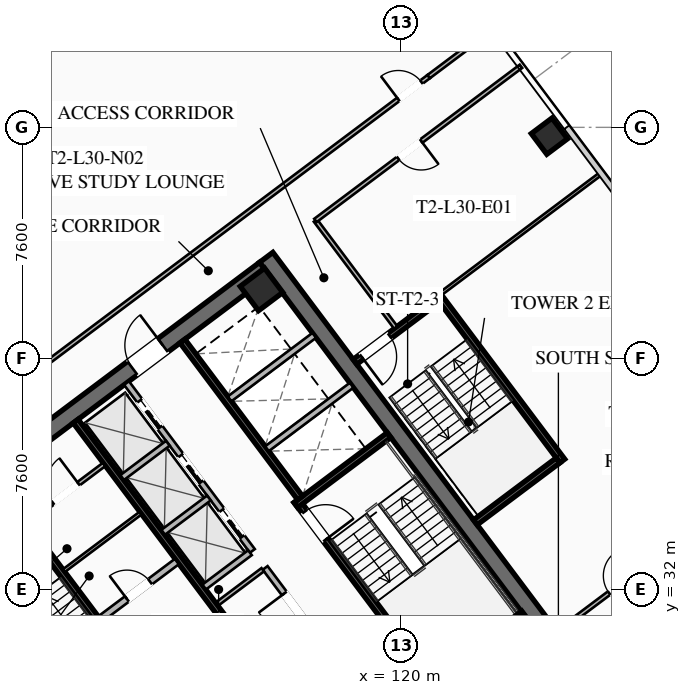
"""IFC4 building model, lengths in metres.
Left out: names, types, materials, properties, quantities, classifications, styles, units other than length and angle.
Written with IfcOpenShell. Run it as: python <this file> out.ifc"""

import sys

from ifc_helpers import new_model, si_unit, direction, frame, frame_2d, origin, origin_2d, place, context, subcontext, project, spatial, rectangle, hollow_rectangle, extrude, element, fill, save


model = new_model("IFC4")
c1 = context("Model", 3, precision=1e-05, world=origin(), true_north=direction((0.0, 1.0)))
c2 = subcontext(c1, "Body", "Model", "MODEL_VIEW")
j1 = project(units=[si_unit("LENGTHUNIT", "METRE"), si_unit("PLANEANGLEUNIT", "RADIAN")], contexts=[c1])
p1 = place(None, origin())
s1 = spatial("IfcSite", under=j1, at=p1, CompositionType="ELEMENT")
p2 = place(p1, origin())
s2 = spatial("IfcBuilding", under=s1, at=p2, CompositionType="ELEMENT")
p3 = place(p2, frame((0.0, 0.0, 114.4)))
s3 = spatial("IfcBuildingStorey", under=s2, at=p3, CompositionType="ELEMENT", Elevation=114.4)
for number, where, z_axis, x_axis in (
    (1, (112.436, 21.077, 0.0), (0.0, 0.0, 1.0), (-0.6, 0.8, 0.0)),
    (2, (115.564, 42.923, 0.0), (0.0, 0.0, 1.0), (0.6, -0.8, 0.0)),
):
    element("IfcWall", number, at=place(p3, frame(where, z_axis=z_axis, x_axis=x_axis)), inside=s3, PredefinedType="SHEAR", context=c2, shape_type="SweptSolid", body=[
        extrude(rectangle(XDim=15.6, YDim=0.55, at=frame_2d((7.8, 0.0))), origin(), (0.0, 0.0, 1.0), 3.55),
    ])
p4 = place(p3, frame((103.461, 33.502, 0.0), z_axis=(0.0, 0.0, 1.0), x_axis=(0.799998054672, 0.600002593761, 0.0)))
e3 = element("IfcWall", 3, at=p4, inside=s3, PredefinedType="SHEAR", context=c2, shape_type="SweptSolid", body=[
    extrude(rectangle(XDim=15.06, YDim=0.55, at=frame_2d((7.53, 0.0))), origin(), (0.0, 0.0, 1.0), 3.55),
])
p5 = place(p4, frame((4.58, 0.0, 0.0)))
e4 = element("IfcOpeningElement", 4, at=p5, cuts=e3, PredefinedType="OPENING", context=c2, shape_type="SweptSolid", body=[
    extrude(rectangle(XDim=1.25, YDim=2.25, at=frame_2d((0.625, 1.125))), frame((0.0, 0.285, 0.0), z_axis=(0.0, -1.0, 0.0), x_axis=(1.0, 0.0, 0.0)), (0.0, 0.0, 1.0), 0.57),
])
p6 = place(p4, frame((9.63, 0.0, 0.0)))
e5 = element("IfcOpeningElement", 5, at=p6, cuts=e3, PredefinedType="OPENING", context=c2, shape_type="SweptSolid", body=[
    extrude(rectangle(XDim=1.25, YDim=2.25, at=frame_2d((0.625, 1.125))), frame((0.0, 0.285, 0.0), z_axis=(0.0, -1.0, 0.0), x_axis=(1.0, 0.0, 0.0)), (0.0, 0.0, 1.0), 0.57),
])
for number, where, z_axis, x_axis in (
    (6, (123.87, 30.59, 0.0), (0.0, 0.0, 1.0), (0.8, 0.6, 0.0)),
    (7, (115.41, 41.87, 0.0), (0.0, 0.0, 1.0), (0.8, 0.6, 0.0)),
):
    element("IfcColumn", number, at=place(p3, frame(where, z_axis=z_axis, x_axis=x_axis)), inside=s3, PredefinedType="COLUMN", context=c2, shape_type="SweptSolid", body=[
        extrude(hollow_rectangle(XDim=1.0, YDim=1.0, WallThickness=0.04, at=origin_2d()), origin(), (0.0, 0.0, 1.0), 3.37),
    ])
p7 = place(p3, frame((124.88, 46.91, 0.0), z_axis=(0.0, 0.0, 1.0), x_axis=(0.799999996291, 0.600000004945, 0.0)))
e8 = element("IfcColumn", 8, at=p7, inside=s3, PredefinedType="COLUMN", context=c2, shape_type="SweptSolid", body=[
    extrude(hollow_rectangle(XDim=0.85, YDim=0.85, WallThickness=0.035, at=origin_2d()), origin(), (0.0, 0.0, 1.0), 3.37),
])
p8 = place(p3, frame((111.44, 29.08, 0.0), z_axis=(0.0, 0.0, 1.0), x_axis=(-0.59999029481, 0.8000072788, 0.0)))
e9 = element("IfcWall", 9, at=p8, inside=s3, PredefinedType="SHEAR", context=c2, shape_type="SweptSolid", body=[
    extrude(rectangle(XDim=8.05, YDim=0.2, at=frame_2d((4.025, 0.0))), origin(), (0.0, 0.0, 1.0), 3.37),
])
p9 = place(p8, frame((0.45, 0.0, 0.0)))
e10 = element("IfcOpeningElement", 10, at=p9, cuts=e9, PredefinedType="OPENING", context=c2, shape_type="SweptSolid", body=[
    extrude(rectangle(XDim=1.15, YDim=2.2, at=frame_2d((0.575, 1.1))), frame((0.0, 0.11, 0.0), z_axis=(0.0, -1.0, 0.0), x_axis=(1.0, 0.0, 0.0)), (0.0, 0.0, 1.0), 0.22),
])
p10 = place(p3, frame((116.56, 34.92, 0.0), z_axis=(0.0, 0.0, 1.0), x_axis=(0.59999029481, -0.8000072788, 0.0)))
e11 = element("IfcWall", 11, at=p10, inside=s3, PredefinedType="SHEAR", context=c2, shape_type="SweptSolid", body=[
    extrude(rectangle(XDim=8.05, YDim=0.2, at=frame_2d((4.025, 0.0))), origin(), (0.0, 0.0, 1.0), 3.37),
])
p11 = place(p10, frame((0.45, 0.0, 0.0)))
e12 = element("IfcOpeningElement", 12, at=p11, cuts=e11, PredefinedType="OPENING", context=c2, shape_type="SweptSolid", body=[
    extrude(rectangle(XDim=1.15, YDim=2.2, at=frame_2d((0.575, 1.1))), frame((0.0, 0.11, 0.0), z_axis=(0.0, -1.0, 0.0), x_axis=(1.0, 0.0, 0.0)), (0.0, 0.0, 1.0), 0.22),
])
for number, where, z_axis, x_axis in (
    (13, (116.54, 34.78, 0.0), (0.0, 0.0, 1.0), (0.8, 0.6, 0.0)),
    (14, (120.98, 28.86, 0.0), (0.0, 0.0, 1.0), (0.8, 0.6, 0.0)),
):
    element("IfcWall", number, at=place(p3, frame(where, z_axis=z_axis, x_axis=x_axis)), inside=s3, PredefinedType="SHEAR", context=c2, shape_type="SweptSolid", body=[
        extrude(rectangle(XDim=3.83, YDim=0.2, at=frame_2d((1.915, 0.0))), origin(), (0.0, 0.0, 1.0), 3.37),
    ])
p12 = place(p3, frame((117.998, 25.936, 0.0), z_axis=(0.0, 0.0, 1.0), x_axis=(-0.600002693989, 0.799997979501, 0.0)))
e15 = element("IfcWall", 15, at=p12, inside=s3, PredefinedType="SHEAR", context=c2, shape_type="SweptSolid", body=[
    extrude(rectangle(XDim=14.5, YDim=0.2, at=frame_2d((7.25, 0.0))), origin(), (0.0, 0.0, 1.0), 3.37),
])
p13 = place(p3, frame((110.104, 31.028, 0.0), z_axis=(0.0, 0.0, 1.0), x_axis=(0.800018601094, 0.59997519774, 0.0)))
e16 = element("IfcWall", 16, at=p13, inside=s3, PredefinedType="SOLIDWALL", context=c2, shape_type="SweptSolid", body=[
    extrude(rectangle(XDim=3.15, YDim=0.22, at=frame_2d((1.575, 0.0))), origin(), (0.0, 0.0, 1.0), 2.723),
])
p14 = place(p13, frame((1.1, 0.0, 0.0)))
e17 = element("IfcOpeningElement", 17, at=p14, cuts=e16, PredefinedType="OPENING", context=c2, shape_type="SweptSolid", body=[
    extrude(rectangle(XDim=0.95, YDim=2.05, at=frame_2d((0.475, 1.025))), frame((0.0, 0.12, 0.0), z_axis=(0.0, -1.0, 0.0), x_axis=(1.0, 0.0, 0.0)), (0.0, 0.0, 1.0), 0.24),
])
p15 = place(p3, frame((112.81, 40.17, 0.0), z_axis=(0.0, 0.0, 1.0), x_axis=(0.599993943644, -0.800004542231, 0.0)))
e18 = element("IfcWall", 18, at=p15, inside=s3, PredefinedType="SHEAR", context=c2, shape_type="SweptSolid", body=[
    extrude(rectangle(XDim=6.45, YDim=0.2, at=frame_2d((3.225, 0.0))), origin(), (0.0, 0.0, 1.0), 3.37),
])
for number, where, z_axis, x_axis in (
    (19, (115.59, 36.63, 0.0), (0.0, 0.0, 1.0), (0.8, 0.6, 0.0)),
    (20, (114.36, 38.27, 0.0), (0.0, 0.0, 1.0), (0.8, 0.6, 0.0)),
):
    element("IfcWall", number, at=place(p3, frame(where, z_axis=z_axis, x_axis=x_axis)), inside=s3, PredefinedType="SOLIDWALL", context=c2, shape_type="SweptSolid", body=[
        extrude(rectangle(XDim=3.48, YDim=0.2, at=frame_2d((1.74, 0.0))), origin(), (0.0, 0.0, 1.0), 3.37),
    ])
p16 = place(p3, frame((107.71, 34.22, 0.0), z_axis=(0.0, 0.0, 1.0), x_axis=(0.799981399002, 0.60002480053, 0.0)))
e21 = element("IfcWall", 21, at=p16, inside=s3, PredefinedType="PARTITIONING", context=c2, shape_type="SweptSolid", body=[
    extrude(rectangle(XDim=3.15, YDim=0.135, at=frame_2d((1.575, 0.0))), origin(), (0.0, 0.0, 1.0), 2.723),
])
p17 = place(p16, frame((1.05, 0.0, 0.0)))
e22 = element("IfcOpeningElement", 22, at=p17, cuts=e21, PredefinedType="OPENING", context=c2, shape_type="SweptSolid", body=[
    extrude(rectangle(XDim=1.05, YDim=2.2, at=frame_2d((0.525, 1.1))), frame((0.0, 0.077, 0.0), z_axis=(0.0, -1.0, 0.0), x_axis=(1.0, 0.0, 0.0)), (0.0, 0.0, 1.0), 0.155),
])
p18 = place(p3, frame((108.91, 32.62, 0.0), z_axis=(0.0, 0.0, 1.0), x_axis=(0.800018601094, 0.59997519774, 0.0)))
e23 = element("IfcWall", 23, at=p18, inside=s3, PredefinedType="PARTITIONING", context=c2, shape_type="SweptSolid", body=[
    extrude(rectangle(XDim=3.15, YDim=0.11, at=frame_2d((1.575, 0.0))), origin(), (0.0, 0.0, 1.0), 2.723),
])
p19 = place(p3, frame((119.67, 27.19, 0.0), z_axis=(0.0, 0.0, 1.0), x_axis=(-0.599988677396, 0.800008491828, 0.0)))
e24 = element("IfcWall", 24, at=p19, inside=s3, PredefinedType="SOLIDWALL", context=c2, shape_type="SweptSolid", body=[
    extrude(rectangle(XDim=6.9, YDim=0.2, at=frame_2d((3.45, 0.0))), origin(), (0.0, 0.0, 1.0), 2.723),
])
p20 = place(p19, frame((0.85, 0.0, 0.0)))
e25 = element("IfcOpeningElement", 25, at=p20, cuts=e24, PredefinedType="OPENING", context=c2, shape_type="SweptSolid", body=[
    extrude(rectangle(XDim=0.95, YDim=2.05, at=frame_2d((0.475, 1.025))), frame((0.0, 0.11, 0.0), z_axis=(0.0, -1.0, 0.0), x_axis=(1.0, 0.0, 0.0)), (0.0, 0.0, 1.0), 0.22),
])
p21 = place(p19, frame((4.8, 0.0, 0.0)))
e26 = element("IfcOpeningElement", 26, at=p21, cuts=e24, PredefinedType="OPENING", context=c2, shape_type="SweptSolid", body=[
    extrude(rectangle(XDim=1.05, YDim=2.2, at=frame_2d((0.525, 1.1))), frame((0.0, 0.11, 0.0), z_axis=(0.0, -1.0, 0.0), x_axis=(1.0, 0.0, 0.0)), (0.0, 0.0, 1.0), 0.22),
])
p22 = place(p3, frame((113.946, 31.522, 0.0), z_axis=(0.0, 0.0, 1.0), x_axis=(0.8, 0.6, 0.0)))
e27 = element("IfcWall", 27, at=p22, inside=s3, PredefinedType="PARTITIONING", context=c2, shape_type="SweptSolid", body=[
    extrude(rectangle(XDim=1.88, YDim=0.135, at=frame_2d((0.94, 0.0))), origin(), (0.0, 0.0, 1.0), 2.723),
])
p23 = place(p3, frame((115.11, 33.27, 0.0), z_axis=(0.0, 0.0, 1.0), x_axis=(-0.600011322243, 0.799991508192, 0.0)))
e28 = element("IfcWall", 28, at=p23, inside=s3, PredefinedType="SOLIDWALL", context=c2, shape_type="SweptSolid", body=[
    extrude(rectangle(XDim=6.9, YDim=0.2, at=frame_2d((3.45, 0.0))), origin(), (0.0, 0.0, 1.0), 3.37),
])
p24 = place(p23, frame((0.575, 0.0, 0.0)))
e29 = element("IfcOpeningElement", 29, at=p24, cuts=e28, PredefinedType="OPENING", context=c2, shape_type="SweptSolid", body=[
    extrude(rectangle(XDim=1.1, YDim=2.2, at=frame_2d((0.55, 1.1))), frame((0.0, 0.11, 0.0), z_axis=(0.0, -1.0, 0.0), x_axis=(1.0, 0.0, 0.0)), (0.0, 0.0, 1.0), 0.22),
])
p25 = place(p23, frame((2.825, 0.0, 0.0)))
e30 = element("IfcOpeningElement", 30, at=p25, cuts=e28, PredefinedType="OPENING", context=c2, shape_type="SweptSolid", body=[
    extrude(rectangle(XDim=1.1, YDim=2.2, at=frame_2d((0.55, 1.1))), frame((0.0, 0.11, 0.0), z_axis=(0.0, -1.0, 0.0), x_axis=(1.0, 0.0, 0.0)), (0.0, 0.0, 1.0), 0.22),
])
p26 = place(p23, frame((5.075, 0.0, 0.0)))
e31 = element("IfcOpeningElement", 31, at=p26, cuts=e28, PredefinedType="OPENING", context=c2, shape_type="SweptSolid", body=[
    extrude(rectangle(XDim=1.1, YDim=2.2, at=frame_2d((0.55, 1.1))), frame((0.0, 0.11, 0.0), z_axis=(0.0, -1.0, 0.0), x_axis=(1.0, 0.0, 0.0)), (0.0, 0.0, 1.0), 0.22),
])
p27 = place(p3, frame((113.526, 32.082, 0.0), z_axis=(0.0, 0.0, 1.0), x_axis=(0.800046745961, 0.599937666993, 0.0)))
e32 = element("IfcWall", 32, at=p27, inside=s3, PredefinedType="SOLIDWALL", context=c2, shape_type="SweptSolid", body=[
    extrude(rectangle(XDim=1.88, YDim=0.2, at=frame_2d((0.94, 0.0))), origin(), (0.0, 0.0, 1.0), 3.37),
])
p28 = place(p3, frame((112.176, 33.882, 0.0), z_axis=(0.0, 0.0, 1.0), x_axis=(0.8, 0.6, 0.0)))
e33 = element("IfcWall", 33, at=p28, inside=s3, PredefinedType="SOLIDWALL", context=c2, shape_type="SweptSolid", body=[
    extrude(rectangle(XDim=1.88, YDim=0.2, at=frame_2d((0.94, 0.0))), origin(), (0.0, 0.0, 1.0), 3.37),
])
p29 = place(p3, frame((110.826, 35.682, 0.0), z_axis=(0.0, 0.0, 1.0), x_axis=(0.799984418148, 0.600020775241, 0.0)))
e34 = element("IfcWall", 34, at=p29, inside=s3, PredefinedType="SOLIDWALL", context=c2, shape_type="SweptSolid", body=[
    extrude(rectangle(XDim=1.88, YDim=0.2, at=frame_2d((0.94, 0.0))), origin(), (0.0, 0.0, 1.0), 3.37),
])
p30 = place(p3, frame((125.304, 36.228, 0.0), z_axis=(0.0, 0.0, 1.0), x_axis=(-0.59998851072, 0.800008616831, 0.0)))
e35 = element("IfcWall", 35, at=p30, inside=s3, PredefinedType="SHEAR", context=c2, shape_type="SweptSolid", body=[
    extrude(rectangle(XDim=6.8, YDim=0.2, at=frame_2d((3.4, 0.0))), origin(), (0.0, 0.0, 1.0), 3.37),
])
p31 = place(p3, frame((121.204, 41.528, 0.0), z_axis=(0.0, 0.0, 1.0), x_axis=(-0.800017232136, -0.599977023131, 0.0)))
e36 = element("IfcWall", 36, at=p31, inside=s3, PredefinedType="SHEAR", context=c2, shape_type="SweptSolid", body=[
    extrude(rectangle(XDim=3.4, YDim=0.2, at=frame_2d((1.7, 0.0))), origin(), (0.0, 0.0, 1.0), 3.37),
])
p32 = place(p31, frame((1.975, 0.0, 0.0)))
e37 = element("IfcOpeningElement", 37, at=p32, cuts=e36, PredefinedType="OPENING", context=c2, shape_type="SweptSolid", body=[
    extrude(rectangle(XDim=1.15, YDim=2.2, at=frame_2d((0.575, 1.1))), frame((0.0, 0.11, 0.0), z_axis=(0.0, -1.0, 0.0), x_axis=(1.0, 0.0, 0.0)), (0.0, 0.0, 1.0), 0.22),
])
p33 = place(p3, frame((122.444, 34.208, 0.0), z_axis=(0.0, 0.0, 1.0), x_axis=(0.79999138319, 0.600011488909, 0.0)))
e38 = element("IfcWall", 38, at=p33, inside=s3, PredefinedType="SHEAR", context=c2, shape_type="SweptSolid", body=[
    extrude(rectangle(XDim=3.4, YDim=0.2, at=frame_2d((1.7, 0.0))), origin(), (0.0, 0.0, 1.0), 3.37),
])
p34 = place(p3, frame((119.824, 40.618, 0.0), z_axis=(0.0, 0.0, 1.0), x_axis=(-0.599982243973, 0.800013316712, 0.0)))
e39 = element("IfcWall", 39, at=p34, inside=s3, PredefinedType="PARTITIONING", context=c2, shape_type="SweptSolid", body=[
    extrude(rectangle(XDim=4.4, YDim=0.135, at=frame_2d((2.2, 0.0))), origin(), (0.0, 0.0, 1.0), 2.723),
])
p35 = place(p3, frame((95.87, 30.09, 0.0), z_axis=(0.0, 0.0, 1.0), x_axis=(0.799997191971, 0.600003744021, 0.0)))
e40 = element("IfcWall", 40, at=p35, inside=s3, PredefinedType="PARTITIONING", context=c2, shape_type="SweptSolid", body=[
    extrude(rectangle(XDim=31.3, YDim=0.135, at=frame_2d((15.65, 0.0))), origin(), (0.0, 0.0, 1.0), 2.723),
])
p36 = place(p35, frame((0.3, 0.0, 0.0)))
e41 = element("IfcOpeningElement", 41, at=p36, cuts=e40, PredefinedType="OPENING", context=c2, shape_type="SweptSolid", body=[
    extrude(rectangle(XDim=0.95, YDim=2.05, at=frame_2d((0.475, 1.025))), frame((0.0, 0.077, 0.0), z_axis=(0.0, -1.0, 0.0), x_axis=(1.0, 0.0, 0.0)), (0.0, 0.0, 1.0), 0.155),
])
p37 = place(p35, frame((30.05, 0.0, 0.0)))
e42 = element("IfcOpeningElement", 42, at=p37, cuts=e40, PredefinedType="OPENING", context=c2, shape_type="SweptSolid", body=[
    extrude(rectangle(XDim=0.95, YDim=2.05, at=frame_2d((0.475, 1.025))), frame((0.0, 0.077, 0.0), z_axis=(0.0, -1.0, 0.0), x_axis=(1.0, 0.0, 0.0)), (0.0, 0.0, 1.0), 0.155),
])
p38 = place(p3, frame((120.91, 48.87, 0.0), z_axis=(0.0, 0.0, 1.0), x_axis=(0.80002227902, 0.599970293491, 0.0)))
e43 = element("IfcWall", 43, at=p38, inside=s3, PredefinedType="PARTITIONING", context=c2, shape_type="SweptSolid", body=[
    extrude(rectangle(XDim=2.63, YDim=0.135, at=frame_2d((1.315, 0.0))), origin(), (0.0, 0.0, 1.0), 2.723),
])
p39 = place(p3, frame((133.282, 32.374, 0.0), z_axis=(0.0, 0.0, 1.0), x_axis=(-0.8, -0.6, 0.0)))
e44 = element("IfcWall", 44, at=p39, inside=s3, PredefinedType="PARTITIONING", context=c2, shape_type="SweptSolid", body=[
    extrude(rectangle(XDim=31.3, YDim=0.135, at=frame_2d((15.65, 0.0))), origin(), (0.0, 0.0, 1.0), 2.723),
])
p40 = place(p39, frame((29.97, 0.0, 0.0)))
e45 = element("IfcOpeningElement", 45, at=p40, cuts=e44, PredefinedType="OPENING", context=c2, shape_type="SweptSolid", body=[
    extrude(rectangle(XDim=0.95, YDim=2.05, at=frame_2d((0.475, 1.025))), frame((0.0, 0.077, 0.0), z_axis=(0.0, -1.0, 0.0), x_axis=(1.0, 0.0, 0.0)), (0.0, 0.0, 1.0), 0.155),
])
p41 = place(p39, frame((19.151, 0.0, 0.0)))
e46 = element("IfcOpeningElement", 46, at=p41, cuts=e44, PredefinedType="OPENING", context=c2, shape_type="SweptSolid", body=[
    extrude(rectangle(XDim=0.95, YDim=2.05, at=frame_2d((0.475, 1.025))), frame((0.0, 0.077, 0.0), z_axis=(0.0, -1.0, 0.0), x_axis=(1.0, 0.0, 0.0)), (0.0, 0.0, 1.0), 0.155),
])
p42 = place(p39, frame((14.901, 0.0, 0.0)))
e47 = element("IfcOpeningElement", 47, at=p42, cuts=e44, PredefinedType="OPENING", context=c2, shape_type="SweptSolid", body=[
    extrude(rectangle(XDim=0.95, YDim=2.05, at=frame_2d((0.475, 1.025))), frame((0.0, 0.077, 0.0), z_axis=(0.0, -1.0, 0.0), x_axis=(1.0, 0.0, 0.0)), (0.0, 0.0, 1.0), 0.155),
])
p43 = place(p39, frame((10.92, 0.0, 0.0)))
e48 = element("IfcOpeningElement", 48, at=p43, cuts=e44, PredefinedType="OPENING", context=c2, shape_type="SweptSolid", body=[
    extrude(rectangle(XDim=0.95, YDim=2.05, at=frame_2d((0.475, 1.025))), frame((0.0, 0.077, 0.0), z_axis=(0.0, -1.0, 0.0), x_axis=(1.0, 0.0, 0.0)), (0.0, 0.0, 1.0), 0.155),
])
p44 = place(p39, frame((0.38, 0.0, 0.0)))
e49 = element("IfcOpeningElement", 49, at=p44, cuts=e44, PredefinedType="OPENING", context=c2, shape_type="SweptSolid", body=[
    extrude(rectangle(XDim=0.95, YDim=2.05, at=frame_2d((0.475, 1.025))), frame((0.0, 0.077, 0.0), z_axis=(0.0, -1.0, 0.0), x_axis=(1.0, 0.0, 0.0)), (0.0, 0.0, 1.0), 0.155),
])
p45 = place(p3, frame((123.944, 49.208, 0.0), z_axis=(0.0, 0.0, 1.0), x_axis=(-0.799996532921, -0.600004622744, 0.0)))
e50 = element("IfcWall", 50, at=p45, inside=s3, PredefinedType="PARTITIONING", context=c2, shape_type="SweptSolid", body=[
    extrude(rectangle(XDim=8.45, YDim=0.135, at=frame_2d((4.225, 0.0))), origin(), (0.0, 0.0, 1.0), 2.723),
])
p46 = place(p45, frame((4.1, 0.0, 0.0)))
e51 = element("IfcOpeningElement", 51, at=p46, cuts=e50, PredefinedType="OPENING", context=c2, shape_type="SweptSolid", body=[
    extrude(rectangle(XDim=0.95, YDim=2.05, at=frame_2d((0.475, 1.025))), frame((0.0, 0.077, 0.0), z_axis=(0.0, -1.0, 0.0), x_axis=(1.0, 0.0, 0.0)), (0.0, 0.0, 1.0), 0.155),
])
p47 = place(p3, frame((125.208, 30.656, 0.0), z_axis=(0.0, 0.0, 1.0), x_axis=(0.799997105034, 0.600003859935, 0.0)))
e52 = element("IfcWall", 52, at=p47, inside=s3, PredefinedType="PARTITIONING", context=c2, shape_type="SweptSolid", body=[
    extrude(rectangle(XDim=10.12, YDim=0.135, at=frame_2d((5.06, 0.0))), origin(), (0.0, 0.0, 1.0), 2.723),
])
p48 = place(p47, frame((2.045, 0.0, 0.0)))
e53 = element("IfcOpeningElement", 53, at=p48, cuts=e52, PredefinedType="OPENING", context=c2, shape_type="SweptSolid", body=[
    extrude(rectangle(XDim=0.95, YDim=2.05, at=frame_2d((0.475, 1.025))), frame((0.0, 0.077, 0.0), z_axis=(0.0, -1.0, 0.0), x_axis=(1.0, 0.0, 0.0)), (0.0, 0.0, 1.0), 0.155),
])
p49 = place(p3, frame((126.584, 45.688, 0.0), z_axis=(0.0, 0.0, 1.0), x_axis=(-0.800004438899, -0.599994081423, 0.0)))
e54 = element("IfcWall", 54, at=p49, inside=s3, PredefinedType="PARTITIONING", context=c2, shape_type="SweptSolid", body=[
    extrude(rectangle(XDim=6.6, YDim=0.11, at=frame_2d((3.3, 0.0))), origin(), (0.0, 0.0, 1.0), 2.723),
])
p50 = place(p3, frame((112.104, 20.928, 0.0), z_axis=(0.0, 0.0, 1.0), x_axis=(-0.599994940075, 0.800003794918, 0.0)))
e55 = element("IfcWall", 55, at=p50, inside=s3, PredefinedType="PARTITIONING", context=c2, shape_type="SweptSolid", body=[
    extrude(rectangle(XDim=15.44, YDim=0.135, at=frame_2d((7.72, 0.0))), origin(), (0.0, 0.0, 1.0), 2.723),
])
p51 = place(p6, origin())
e56 = element("IfcDoor", 56, at=p51, inside=s3, OperationType="SINGLE_SWING_RIGHT", PredefinedType="DOOR", context=c2, shape_type="SweptSolid", body=[
    extrude(rectangle(XDim=1.25, YDim=2.25, at=frame_2d((0.625, 1.125))), frame((0.0, 0.025, 0.0), z_axis=(0.0, -1.0, 0.0), x_axis=(1.0, 0.0, 0.0)), (0.0, 0.0, 1.0), 0.05),
])
fill(e5, e56)
p52 = place(p11, origin())
e57 = element("IfcDoor", 57, at=p52, inside=s3, OperationType="SINGLE_SWING_RIGHT", PredefinedType="DOOR", context=c2, shape_type="SweptSolid", body=[
    extrude(rectangle(XDim=1.15, YDim=2.2, at=frame_2d((0.575, 1.1))), frame((0.0, 0.025, 0.0), z_axis=(0.0, -1.0, 0.0), x_axis=(1.0, 0.0, 0.0)), (0.0, 0.0, 1.0), 0.05),
])
fill(e12, e57)
p53 = place(p17, origin())
e58 = element("IfcDoor", 58, at=p53, inside=s3, OperationType="SINGLE_SWING_RIGHT", PredefinedType="DOOR", context=c2, shape_type="SweptSolid", body=[
    extrude(rectangle(XDim=1.05, YDim=2.2, at=frame_2d((0.525, 1.1))), frame((0.0, 0.025, 0.0), z_axis=(0.0, -1.0, 0.0), x_axis=(1.0, 0.0, 0.0)), (0.0, 0.0, 1.0), 0.05),
])
fill(e22, e58)
p54 = place(p14, origin())
e59 = element("IfcDoor", 59, at=p54, inside=s3, OperationType="SINGLE_SWING_LEFT", PredefinedType="DOOR", context=c2, shape_type="SweptSolid", body=[
    extrude(rectangle(XDim=0.95, YDim=2.05, at=frame_2d((0.475, 1.025))), frame((0.0, 0.025, 0.0), z_axis=(0.0, -1.0, 0.0), x_axis=(1.0, 0.0, 0.0)), (0.0, 0.0, 1.0), 0.05),
])
fill(e17, e59)
p55 = place(p21, origin())
e60 = element("IfcDoor", 60, at=p55, inside=s3, OperationType="SINGLE_SWING_RIGHT", PredefinedType="DOOR", context=c2, shape_type="SweptSolid", body=[
    extrude(rectangle(XDim=1.05, YDim=2.2, at=frame_2d((0.525, 1.1))), frame((0.0, 0.025, 0.0), z_axis=(0.0, -1.0, 0.0), x_axis=(1.0, 0.0, 0.0)), (0.0, 0.0, 1.0), 0.05),
])
fill(e26, e60)
p56 = place(p32, origin())
e61 = element("IfcDoor", 61, at=p56, inside=s3, OperationType="SINGLE_SWING_RIGHT", PredefinedType="DOOR", context=c2, shape_type="SweptSolid", body=[
    extrude(rectangle(XDim=1.15, YDim=2.2, at=frame_2d((0.575, 1.1))), frame((0.0, 0.025, 0.0), z_axis=(0.0, -1.0, 0.0), x_axis=(1.0, 0.0, 0.0)), (0.0, 0.0, 1.0), 0.05),
])
fill(e37, e61)
p57 = place(p37, origin())
e62 = element("IfcDoor", 62, at=p57, inside=s3, OperationType="SINGLE_SWING_LEFT", PredefinedType="DOOR", context=c2, shape_type="SweptSolid", body=[
    extrude(rectangle(XDim=0.95, YDim=2.05, at=frame_2d((0.475, 1.025))), frame((0.0, 0.025, 0.0), z_axis=(0.0, -1.0, 0.0), x_axis=(1.0, 0.0, 0.0)), (0.0, 0.0, 1.0), 0.05),
])
fill(e42, e62)
p58 = place(p46, origin())
e63 = element("IfcDoor", 63, at=p58, inside=s3, OperationType="SINGLE_SWING_LEFT", PredefinedType="DOOR", context=c2, shape_type="SweptSolid", body=[
    extrude(rectangle(XDim=0.95, YDim=2.05, at=frame_2d((0.475, 1.025))), frame((0.0, 0.025, 0.0), z_axis=(0.0, -1.0, 0.0), x_axis=(1.0, 0.0, 0.0)), (0.0, 0.0, 1.0), 0.05),
])
fill(e51, e63)
p59 = place(p48, origin())
e64 = element("IfcDoor", 64, at=p59, inside=s3, OperationType="SINGLE_SWING_RIGHT", PredefinedType="DOOR", context=c2, shape_type="SweptSolid", body=[
    extrude(rectangle(XDim=0.95, YDim=2.05, at=frame_2d((0.475, 1.025))), frame((0.0, 0.025, 0.0), z_axis=(0.0, -1.0, 0.0), x_axis=(1.0, 0.0, 0.0)), (0.0, 0.0, 1.0), 0.05),
])
fill(e53, e64)
p60 = place(p24, origin())
e65 = element("IfcDoor", 65, at=p60, inside=s3, OperationType="SLIDING_TO_LEFT", PredefinedType="DOOR", context=c2, shape_type="SweptSolid", body=[
    extrude(rectangle(XDim=1.1, YDim=2.2, at=frame_2d((0.55, 1.1))), frame((0.0, 0.025, 0.0), z_axis=(0.0, -1.0, 0.0), x_axis=(1.0, 0.0, 0.0)), (0.0, 0.0, 1.0), 0.05),
])
fill(e29, e65)
p61 = place(p25, origin())
e66 = element("IfcDoor", 66, at=p61, inside=s3, OperationType="SLIDING_TO_LEFT", PredefinedType="DOOR", context=c2, shape_type="SweptSolid", body=[
    extrude(rectangle(XDim=1.1, YDim=2.2, at=frame_2d((0.55, 1.1))), frame((0.0, 0.025, 0.0), z_axis=(0.0, -1.0, 0.0), x_axis=(1.0, 0.0, 0.0)), (0.0, 0.0, 1.0), 0.05),
])
fill(e30, e66)
p62 = place(p26, origin())
e67 = element("IfcDoor", 67, at=p62, inside=s3, OperationType="SLIDING_TO_LEFT", PredefinedType="DOOR", context=c2, shape_type="SweptSolid", body=[
    extrude(rectangle(XDim=1.1, YDim=2.2, at=frame_2d((0.55, 1.1))), frame((0.0, 0.025, 0.0), z_axis=(0.0, -1.0, 0.0), x_axis=(1.0, 0.0, 0.0)), (0.0, 0.0, 1.0), 0.05),
])
fill(e31, e67)
save(model, sys.argv[1])
